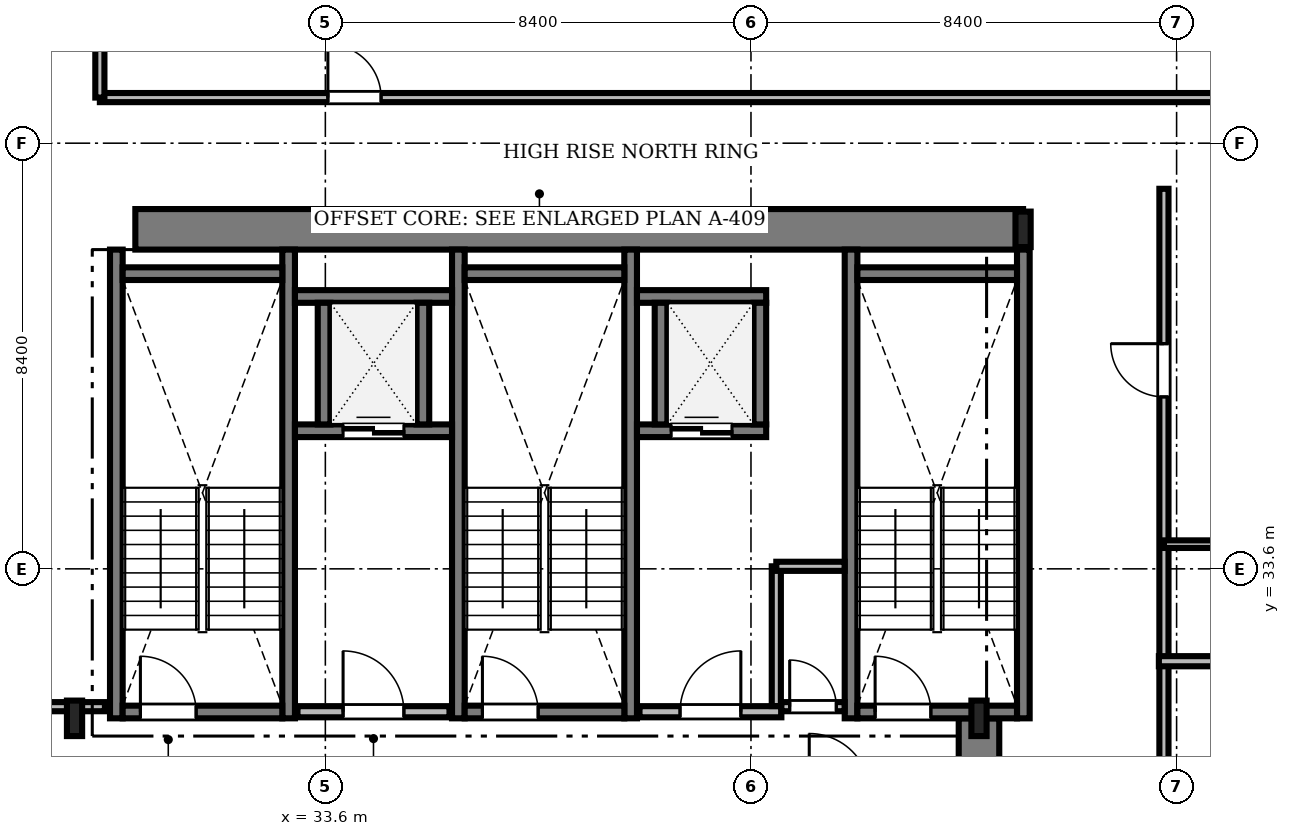
"""IFC4 building model, lengths in metres.
Left out: names, types, materials, properties, quantities, classifications, styles, units other than length and angle.
Written with IfcOpenShell. Run it as: python <this file> out.ifc"""

import sys

from ifc_helpers import new_model, si_unit, direction, frame, frame_2d, origin, origin_2d, place, context, subcontext, project, spatial, rectangle, i_section, extrude, source, transform, mapped, element, fill, save


model = new_model("IFC4")
c1 = context("Model", 3, precision=1e-05, world=origin(), true_north=direction((0.0, 1.0)))
c2 = subcontext(c1, "Body", "Model", "MODEL_VIEW")
j1 = project(units=[si_unit("LENGTHUNIT", "METRE"), si_unit("PLANEANGLEUNIT", "RADIAN")], contexts=[c1])
p1 = place(None, origin())
s1 = spatial("IfcSite", under=j1, at=p1, CompositionType="ELEMENT")
p2 = place(p1, origin())
s2 = spatial("IfcBuilding", under=s1, at=p2, CompositionType="ELEMENT")
p3 = place(p2, frame((0.0, 0.0, 188.55)))
s3 = spatial("IfcBuildingStorey", under=s2, at=p3, CompositionType="ELEMENT", Elevation=188.55)
m1 = source(origin(), c2, "Body", "SweptSolid", [
    extrude(rectangle(XDim=17.52, YDim=0.8, at=frame_2d((8.76, 0.0))), origin(), (0.0, 0.0, 1.0), 3.53),
])
p4 = place(p3, frame((29.85, 40.3, 0.0), z_axis=(0.0, 0.0, 1.0), x_axis=(1.0, 0.0, 0.0)))
e1 = element("IfcWall", 1, at=p4, inside=s3, PredefinedType="SHEAR", context=c2, shape_type="MappedRepresentation", body=[
    mapped(m1, transform((0.0, 0.0, 0.0), scale=1.0)),
])
m2 = source(origin(), c2, "Body", "SweptSolid", [
    extrude(rectangle(XDim=13.15, YDim=0.8, at=frame_2d((6.575, 0.0))), origin(), (0.0, 0.0, 1.0), 3.53),
])
p5 = place(p3, frame((46.5, 17.5, 0.0), z_axis=(0.0, 0.0, 1.0), x_axis=(0.0, 1.0, 0.0)))
e2 = element("IfcWall", 2, at=p5, inside=s3, PredefinedType="SHEAR", context=c2, shape_type="MappedRepresentation", body=[
    mapped(m2, transform((0.0, 0.0, 0.0), scale=1.0)),
])
m3 = source(origin(), c2, "Body", "SweptSolid", [
    extrude(i_section(OverallWidth=0.3, OverallDepth=0.7, WebThickness=0.017, FlangeThickness=0.032, FilletRadius=0.027, at=origin_2d()), origin(), (0.0, 0.0, 1.0), 3.53),
])
for number, where, z_axis, x_axis in (
    (3, (28.65, 30.65, 0.0), (0.0, 0.0, 1.0), (1.0, 0.0, 0.0)),
    (4, (46.5, 30.65, 0.0), (0.0, 0.0, 1.0), (1.0, 0.0, 0.0)),
    (5, (47.37, 40.3, 0.0), (0.0, 0.0, 1.0), (1.0, 0.0, 0.0)),
):
    element("IfcColumn", number, at=place(p3, frame(where, z_axis=z_axis, x_axis=x_axis)), inside=s3, PredefinedType="COLUMN", context=c2, shape_type="MappedRepresentation", body=[
        mapped(m3, transform((0.0, 0.0, 0.0), scale=1.0)),
    ])
m4 = source(origin(), c2, "Body", "SweptSolid", [
    extrude(rectangle(XDim=9.25, YDim=0.25, at=frame_2d((4.625, 0.0))), origin(), (0.0, 0.0, 1.0), 3.55),
])
for number, where, z_axis, x_axis in (
    (6, (29.475, 30.65, 0.0), (0.0, 0.0, 1.0), (0.0, 1.0, 0.0)),
    (7, (32.875, 30.65, 0.0), (0.0, 0.0, 1.0), (0.0, 1.0, 0.0)),
):
    element("IfcWall", number, at=place(p3, frame(where, z_axis=z_axis, x_axis=x_axis)), inside=s3, PredefinedType="SOLIDWALL", context=c2, shape_type="MappedRepresentation", body=[
        mapped(m4, transform((0.0, 0.0, 0.0), scale=1.0)),
    ])
m5 = source(origin(), c2, "Body", "SweptSolid", [
    extrude(rectangle(XDim=3.15, YDim=0.25, at=frame_2d((1.575, 0.0))), origin(), (0.0, 0.0, 1.0), 3.55),
])
p6 = place(p3, frame((29.6, 39.425, 0.0), z_axis=(0.0, 0.0, 1.0), x_axis=(1.0, 0.0, 0.0)))
e8 = element("IfcWall", 8, at=p6, inside=s3, PredefinedType="SOLIDWALL", context=c2, shape_type="MappedRepresentation", body=[
    mapped(m5, transform((0.0, 0.0, 0.0), scale=1.0)),
])
p7 = place(p3, frame((29.6, 30.775, 0.0), z_axis=(0.0, 0.0, 1.0), x_axis=(1.0, 0.0, 0.0)))
e9 = element("IfcWall", 9, at=p7, inside=s3, PredefinedType="SOLIDWALL", context=c2, shape_type="MappedRepresentation", body=[
    mapped(m5, transform((0.0, 0.0, 0.0), scale=1.0)),
])
m6 = source(origin(), c2, "Body", "SweptSolid", [
    extrude(rectangle(XDim=1.1, YDim=2.2, at=frame_2d((0.55, 1.1))), frame((0.0, 0.135, 0.0), z_axis=(0.0, -1.0, 0.0), x_axis=(1.0, 0.0, 0.0)), (0.0, 0.0, 1.0), 0.27),
])
p8 = place(p7, frame((0.35, 0.0, 0.0)))
e10 = element("IfcOpeningElement", 10, at=p8, cuts=e9, PredefinedType="OPENING", context=c2, shape_type="MappedRepresentation", body=[
    mapped(m6, transform((0.0, 0.0, 0.0), scale=1.0)),
])
for number, where, z_axis, x_axis in (
    (11, (36.225, 30.65, 0.0), (0.0, 0.0, 1.0), (0.0, 1.0, 0.0)),
    (12, (39.625, 30.65, 0.0), (0.0, 0.0, 1.0), (0.0, 1.0, 0.0)),
):
    element("IfcWall", number, at=place(p3, frame(where, z_axis=z_axis, x_axis=x_axis)), inside=s3, PredefinedType="SOLIDWALL", context=c2, shape_type="MappedRepresentation", body=[
        mapped(m4, transform((0.0, 0.0, 0.0), scale=1.0)),
    ])
p9 = place(p3, frame((36.35, 39.425, 0.0), z_axis=(0.0, 0.0, 1.0), x_axis=(1.0, 0.0, 0.0)))
e13 = element("IfcWall", 13, at=p9, inside=s3, PredefinedType="SOLIDWALL", context=c2, shape_type="MappedRepresentation", body=[
    mapped(m5, transform((0.0, 0.0, 0.0), scale=1.0)),
])
p10 = place(p3, frame((36.35, 30.775, 0.0), z_axis=(0.0, 0.0, 1.0), x_axis=(1.0, 0.0, 0.0)))
e14 = element("IfcWall", 14, at=p10, inside=s3, PredefinedType="SOLIDWALL", context=c2, shape_type="MappedRepresentation", body=[
    mapped(m5, transform((0.0, 0.0, 0.0), scale=1.0)),
])
p11 = place(p10, frame((0.35, 0.0, 0.0)))
e15 = element("IfcOpeningElement", 15, at=p11, cuts=e14, PredefinedType="OPENING", context=c2, shape_type="MappedRepresentation", body=[
    mapped(m6, transform((0.0, 0.0, 0.0), scale=1.0)),
])
for number, where, z_axis, x_axis in (
    (16, (43.975, 30.65, 0.0), (0.0, 0.0, 1.0), (0.0, 1.0, 0.0)),
    (17, (47.375, 30.65, 0.0), (0.0, 0.0, 1.0), (0.0, 1.0, 0.0)),
):
    element("IfcWall", number, at=place(p3, frame(where, z_axis=z_axis, x_axis=x_axis)), inside=s3, PredefinedType="SOLIDWALL", context=c2, shape_type="MappedRepresentation", body=[
        mapped(m4, transform((0.0, 0.0, 0.0), scale=1.0)),
    ])
p12 = place(p3, frame((44.1, 39.425, 0.0), z_axis=(0.0, 0.0, 1.0), x_axis=(1.0, 0.0, 0.0)))
e18 = element("IfcWall", 18, at=p12, inside=s3, PredefinedType="SOLIDWALL", context=c2, shape_type="MappedRepresentation", body=[
    mapped(m5, transform((0.0, 0.0, 0.0), scale=1.0)),
])
p13 = place(p3, frame((44.1, 30.775, 0.0), z_axis=(0.0, 0.0, 1.0), x_axis=(1.0, 0.0, 0.0)))
e19 = element("IfcWall", 19, at=p13, inside=s3, PredefinedType="SOLIDWALL", context=c2, shape_type="MappedRepresentation", body=[
    mapped(m5, transform((0.0, 0.0, 0.0), scale=1.0)),
])
p14 = place(p13, frame((0.35, 0.0, 0.0)))
e20 = element("IfcOpeningElement", 20, at=p14, cuts=e19, PredefinedType="OPENING", context=c2, shape_type="MappedRepresentation", body=[
    mapped(m6, transform((0.0, 0.0, 0.0), scale=1.0)),
])
m7 = source(origin(), c2, "Body", "SweptSolid", [
    extrude(rectangle(XDim=3.0, YDim=0.22, at=frame_2d((1.5, 0.0))), origin(), (0.0, 0.0, 1.0), 3.53),
])
p15 = place(p3, frame((33.05, 30.78, 0.0), z_axis=(0.0, 0.0, 1.0), x_axis=(1.0, 0.0, 0.0)))
e21 = element("IfcWall", 21, at=p15, inside=s3, PredefinedType="SOLIDWALL", context=c2, shape_type="MappedRepresentation", body=[
    mapped(m7, transform((0.0, 0.0, 0.0), scale=1.0)),
])
m8 = source(origin(), c2, "Body", "SweptSolid", [
    extrude(rectangle(XDim=1.2, YDim=2.2, at=frame_2d((0.6, 1.1))), frame((0.0, 0.12, 0.0), z_axis=(0.0, -1.0, 0.0), x_axis=(1.0, 0.0, 0.0)), (0.0, 0.0, 1.0), 0.24),
])
p16 = place(p15, frame((0.9, 0.0, 0.0)))
e22 = element("IfcOpeningElement", 22, at=p16, cuts=e21, PredefinedType="OPENING", context=c2, shape_type="MappedRepresentation", body=[
    mapped(m8, transform((0.0, 0.0, 0.0), scale=1.0)),
])
m9 = source(origin(), c2, "Body", "SweptSolid", [
    extrude(rectangle(XDim=2.8, YDim=0.22, at=frame_2d((1.4, 0.0))), origin(), (0.0, 0.0, 1.0), 3.53),
])
p17 = place(p3, frame((39.8, 30.78, 0.0), z_axis=(0.0, 0.0, 1.0), x_axis=(1.0, 0.0, 0.0)))
e23 = element("IfcWall", 23, at=p17, inside=s3, PredefinedType="SOLIDWALL", context=c2, shape_type="MappedRepresentation", body=[
    mapped(m9, transform((0.0, 0.0, 0.0), scale=1.0)),
])
p18 = place(p17, frame((0.8, 0.0, 0.0)))
e24 = element("IfcOpeningElement", 24, at=p18, cuts=e23, PredefinedType="OPENING", context=c2, shape_type="MappedRepresentation", body=[
    mapped(m8, transform((0.0, 0.0, 0.0), scale=1.0)),
])
m10 = source(origin(), c2, "Body", "SweptSolid", [
    extrude(rectangle(XDim=3.1, YDim=0.25, at=frame_2d((1.55, 0.0))), origin(), (0.0, 0.0, 1.0), 3.53),
])
p19 = place(p3, frame((33.0, 36.325, 0.0), z_axis=(0.0, 0.0, 1.0), x_axis=(1.0, 0.0, 0.0)))
e25 = element("IfcWall", 25, at=p19, inside=s3, PredefinedType="SOLIDWALL", context=c2, shape_type="MappedRepresentation", body=[
    mapped(m10, transform((0.0, 0.0, 0.0), scale=1.0)),
])
m11 = source(origin(), c2, "Body", "SweptSolid", [
    extrude(rectangle(XDim=1.2, YDim=2.25, at=frame_2d((0.6, 1.125))), frame((0.0, 0.135, 0.0), z_axis=(0.0, -1.0, 0.0), x_axis=(1.0, 0.0, 0.0)), (0.0, 0.0, 1.0), 0.27),
])
p20 = place(p19, frame((0.95, 0.0, 0.0)))
e26 = element("IfcOpeningElement", 26, at=p20, cuts=e25, PredefinedType="OPENING", context=c2, shape_type="MappedRepresentation", body=[
    mapped(m11, transform((0.0, 0.0, 0.0), scale=1.0)),
])
p21 = place(p3, frame((33.0, 38.975, 0.0), z_axis=(0.0, 0.0, 1.0), x_axis=(1.0, 0.0, 0.0)))
e27 = element("IfcWall", 27, at=p21, inside=s3, PredefinedType="SOLIDWALL", context=c2, shape_type="MappedRepresentation", body=[
    mapped(m10, transform((0.0, 0.0, 0.0), scale=1.0)),
])
m12 = source(origin(), c2, "Body", "SweptSolid", [
    extrude(rectangle(XDim=2.4, YDim=0.25, at=frame_2d((1.2, 0.0))), origin(), (0.0, 0.0, 1.0), 3.53),
])
for number, where, z_axis, x_axis in (
    (28, (33.575, 36.45, 0.0), (0.0, 0.0, 1.0), (0.0, 1.0, 0.0)),
    (29, (35.525, 36.45, 0.0), (0.0, 0.0, 1.0), (0.0, 1.0, 0.0)),
):
    element("IfcWall", number, at=place(p3, frame(where, z_axis=z_axis, x_axis=x_axis)), inside=s3, PredefinedType="SOLIDWALL", context=c2, shape_type="MappedRepresentation", body=[
        mapped(m12, transform((0.0, 0.0, 0.0), scale=1.0)),
    ])
m13 = source(origin(), c2, "Body", "SweptSolid", [
    extrude(rectangle(XDim=2.55, YDim=0.25, at=frame_2d((1.275, 0.0))), origin(), (0.0, 0.0, 1.0), 3.53),
])
p22 = place(p3, frame((39.75, 36.325, 0.0), z_axis=(0.0, 0.0, 1.0), x_axis=(1.0, 0.0, 0.0)))
e30 = element("IfcWall", 30, at=p22, inside=s3, PredefinedType="SOLIDWALL", context=c2, shape_type="MappedRepresentation", body=[
    mapped(m13, transform((0.0, 0.0, 0.0), scale=1.0)),
])
p23 = place(p22, frame((0.675, 0.0, 0.0)))
e31 = element("IfcOpeningElement", 31, at=p23, cuts=e30, PredefinedType="OPENING", context=c2, shape_type="MappedRepresentation", body=[
    mapped(m11, transform((0.0, 0.0, 0.0), scale=1.0)),
])
p24 = place(p3, frame((39.75, 38.975, 0.0), z_axis=(0.0, 0.0, 1.0), x_axis=(1.0, 0.0, 0.0)))
e32 = element("IfcWall", 32, at=p24, inside=s3, PredefinedType="SOLIDWALL", context=c2, shape_type="MappedRepresentation", body=[
    mapped(m13, transform((0.0, 0.0, 0.0), scale=1.0)),
])
for number, where, z_axis, x_axis in (
    (33, (40.225, 36.45, 0.0), (0.0, 0.0, 1.0), (0.0, 1.0, 0.0)),
    (34, (42.175, 36.45, 0.0), (0.0, 0.0, 1.0), (0.0, 1.0, 0.0)),
):
    element("IfcWall", number, at=place(p3, frame(where, z_axis=z_axis, x_axis=x_axis)), inside=s3, PredefinedType="SOLIDWALL", context=c2, shape_type="MappedRepresentation", body=[
        mapped(m12, transform((0.0, 0.0, 0.0), scale=1.0)),
    ])
m14 = source(origin(), c2, "Body", "SweptSolid", [
    extrude(rectangle(XDim=28.428, YDim=0.18, at=frame_2d((14.214, 0.0))), origin(), (0.0, 0.0, 1.0), 2.772),
])
p25 = place(p3, frame((29.15, 42.9, 0.0), z_axis=(0.0, 0.0, 1.0), x_axis=(1.0, 0.0, 0.0)))
e35 = element("IfcWall", 35, at=p25, inside=s3, PredefinedType="PARTITIONING", context=c2, shape_type="MappedRepresentation", body=[
    mapped(m14, transform((0.0, 0.0, 0.0), scale=1.0)),
])
m15 = source(origin(), c2, "Body", "SweptSolid", [
    extrude(rectangle(XDim=1.05, YDim=2.2, at=frame_2d((0.525, 1.1))), frame((0.0, 0.1, 0.0), z_axis=(0.0, -1.0, 0.0), x_axis=(1.0, 0.0, 0.0)), (0.0, 0.0, 1.0), 0.2),
])
p26 = place(p25, frame((4.5, 0.0, 0.0)))
e36 = element("IfcOpeningElement", 36, at=p26, cuts=e35, PredefinedType="OPENING", context=c2, shape_type="MappedRepresentation", body=[
    mapped(m15, transform((0.0, 0.0, 0.0), scale=1.0)),
])
m16 = source(origin(), c2, "Body", "SweptSolid", [
    extrude(rectangle(XDim=27.53, YDim=0.18, at=frame_2d((13.765, 0.0))), origin(), (0.0, 0.0, 1.0), 2.972),
])
p27 = place(p3, frame((50.15, 13.57, 0.0), z_axis=(0.0, 0.0, 1.0), x_axis=(0.0, 1.0, 0.0)))
e37 = element("IfcWall", 37, at=p27, inside=s3, PredefinedType="PARTITIONING", context=c2, shape_type="MappedRepresentation", body=[
    mapped(m16, transform((0.0, 0.0, 0.0), scale=1.0)),
])
p28 = place(p27, frame((5.217, 0.0, 0.0)))
e38 = element("IfcOpeningElement", 38, at=p28, cuts=e37, PredefinedType="OPENING", context=c2, shape_type="MappedRepresentation", body=[
    mapped(m15, transform((0.0, 0.0, 0.0), scale=1.0)),
])
p29 = place(p27, frame((14.32, 0.0, 0.0)))
e39 = element("IfcOpeningElement", 39, at=p29, cuts=e37, PredefinedType="OPENING", context=c2, shape_type="MappedRepresentation", body=[
    mapped(m15, transform((0.0, 0.0, 0.0), scale=1.0)),
])
p30 = place(p27, frame((23.423, 0.0, 0.0)))
e40 = element("IfcOpeningElement", 40, at=p30, cuts=e37, PredefinedType="OPENING", context=c2, shape_type="MappedRepresentation", body=[
    mapped(m15, transform((0.0, 0.0, 0.0), scale=1.0)),
])
m17 = source(origin(), c2, "Body", "SweptSolid", [
    extrude(rectangle(XDim=17.828, YDim=0.18, at=frame_2d((8.914, 0.0))), origin(), (0.0, 0.0, 1.0), 2.772),
])
p31 = place(p3, frame((11.422, 30.88, 0.0), z_axis=(0.0, 0.0, 1.0), x_axis=(1.0, 0.0, 0.0)))
e41 = element("IfcWall", 41, at=p31, inside=s3, PredefinedType="PARTITIONING", context=c2, shape_type="MappedRepresentation", body=[
    mapped(m17, transform((0.0, 0.0, 0.0), scale=1.0)),
])
p32 = place(p31, frame((10.778, 0.0, 0.0)))
e42 = element("IfcOpeningElement", 42, at=p32, cuts=e41, PredefinedType="OPENING", context=c2, shape_type="MappedRepresentation", body=[
    mapped(m15, transform((0.0, 0.0, 0.0), scale=1.0)),
])
m18 = source(origin(), c2, "Body", "SweptSolid", [
    extrude(rectangle(XDim=1.248, YDim=0.18, at=frame_2d((0.624, 0.0))), origin(), (0.0, 0.0, 1.0), 3.53),
])
p33 = place(p3, frame((42.6, 30.88, 0.0), z_axis=(0.0, 0.0, 1.0), x_axis=(1.0, 0.0, 0.0)))
e43 = element("IfcWall", 43, at=p33, inside=s3, PredefinedType="PARTITIONING", context=c2, shape_type="MappedRepresentation", body=[
    mapped(m18, transform((0.0, 0.0, 0.0), scale=1.0)),
])
m19 = source(origin(), c2, "Body", "SweptSolid", [
    extrude(rectangle(XDim=0.92, YDim=2.1, at=frame_2d((0.46, 1.05))), frame((0.0, 0.1, 0.0), z_axis=(0.0, -1.0, 0.0), x_axis=(1.0, 0.0, 0.0)), (0.0, 0.0, 1.0), 0.2),
])
p34 = place(p33, frame((0.164, 0.0, 0.0)))
e44 = element("IfcOpeningElement", 44, at=p34, cuts=e43, PredefinedType="OPENING", context=c2, shape_type="MappedRepresentation", body=[
    mapped(m19, transform((0.0, 0.0, 0.0), scale=1.0)),
])
m20 = source(origin(), c2, "Body", "SweptSolid", [
    extrude(rectangle(XDim=7.528, YDim=0.2, at=frame_2d((3.764, 0.0))), origin(), (0.0, 0.0, 1.0), 2.772),
])
p35 = place(p3, frame((50.05, 31.777, 0.0), z_axis=(0.0, 0.0, 1.0), x_axis=(1.0, 0.0, 0.0)))
e45 = element("IfcWall", 45, at=p35, inside=s3, PredefinedType="PARTITIONING", context=c2, shape_type="MappedRepresentation", body=[
    mapped(m20, transform((0.0, 0.0, 0.0), scale=1.0)),
])
m21 = source(origin(), c2, "Body", "SweptSolid", [
    extrude(rectangle(XDim=5.378, YDim=0.18, at=frame_2d((2.689, 0.0))), origin(), (0.0, 0.0, 1.0), 2.772),
])
p36 = place(p3, frame((29.15, 42.9, 0.0), z_axis=(0.0, 0.0, 1.0), x_axis=(0.0, 1.0, 0.0)))
e46 = element("IfcWall", 46, at=p36, inside=s3, PredefinedType="PARTITIONING", context=c2, shape_type="MappedRepresentation", body=[
    mapped(m21, transform((0.0, 0.0, 0.0), scale=1.0)),
])
m22 = source(origin(), c2, "Body", "SweptSolid", [
    extrude(rectangle(XDim=2.758, YDim=0.18, at=frame_2d((1.379, 0.0))), origin(), (0.0, 0.0, 1.0), 3.53),
])
p37 = place(p3, frame((42.5, 30.892, 0.0), z_axis=(0.0, 0.0, 1.0), x_axis=(0.0, 1.0, 0.0)))
e47 = element("IfcWall", 47, at=p37, inside=s3, PredefinedType="PARTITIONING", context=c2, shape_type="MappedRepresentation", body=[
    mapped(m22, transform((0.0, 0.0, 0.0), scale=1.0)),
])
m23 = source(origin(), c2, "Body", "SweptSolid", [
    extrude(rectangle(XDim=2.36, YDim=0.15, at=frame_2d((1.18, 0.0))), origin(), (0.0, 0.0, 1.0), 3.53),
])
p38 = place(p3, frame((50.15, 34.087, 0.0), z_axis=(0.0, 0.0, 1.0), x_axis=(1.0, 0.0, 0.0)))
e48 = element("IfcWall", 48, at=p38, inside=s3, PredefinedType="PARTITIONING", context=c2, shape_type="MappedRepresentation", body=[
    mapped(m23, transform((0.0, 0.0, 0.0), scale=1.0)),
])
m24 = source(origin(), c2, "Body", "SweptSolid", [
    extrude(rectangle(XDim=1.348, YDim=0.18, at=frame_2d((0.674, 0.0))), origin(), (0.0, 0.0, 1.0), 3.53),
])
p39 = place(p3, frame((42.5, 33.65, 0.0), z_axis=(0.0, 0.0, 1.0), x_axis=(1.0, 0.0, 0.0)))
e49 = element("IfcWall", 49, at=p39, inside=s3, PredefinedType="PARTITIONING", context=c2, shape_type="MappedRepresentation", body=[
    mapped(m24, transform((0.0, 0.0, 0.0), scale=1.0)),
])
m25 = source(origin(), c2, "Body", "SweptSolid", [
    extrude(rectangle(XDim=1.1, YDim=2.2, at=frame_2d((0.55, 1.1))), frame((0.0, 0.025, 0.0), z_axis=(0.0, -1.0, 0.0), x_axis=(1.0, 0.0, 0.0)), (0.0, 0.0, 1.0), 0.05),
])
p40 = place(p8, origin())
e50 = element("IfcDoor", 50, at=p40, inside=s3, OperationType="SINGLE_SWING_LEFT", PredefinedType="DOOR", context=c2, shape_type="MappedRepresentation", body=[
    mapped(m25, transform((0.0, 0.0, 0.0), scale=1.0)),
])
fill(e10, e50)
p41 = place(p11, origin())
e51 = element("IfcDoor", 51, at=p41, inside=s3, OperationType="SINGLE_SWING_LEFT", PredefinedType="DOOR", context=c2, shape_type="MappedRepresentation", body=[
    mapped(m25, transform((0.0, 0.0, 0.0), scale=1.0)),
])
fill(e15, e51)
p42 = place(p14, origin())
e52 = element("IfcDoor", 52, at=p42, inside=s3, OperationType="SINGLE_SWING_LEFT", PredefinedType="DOOR", context=c2, shape_type="MappedRepresentation", body=[
    mapped(m25, transform((0.0, 0.0, 0.0), scale=1.0)),
])
fill(e20, e52)
m26 = source(origin(), c2, "Body", "SweptSolid", [
    extrude(rectangle(XDim=1.2, YDim=2.2, at=frame_2d((0.6, 1.1))), frame((0.0, 0.025, 0.0), z_axis=(0.0, -1.0, 0.0), x_axis=(1.0, 0.0, 0.0)), (0.0, 0.0, 1.0), 0.05),
])
p43 = place(p16, origin())
e53 = element("IfcDoor", 53, at=p43, inside=s3, OperationType="SINGLE_SWING_LEFT", PredefinedType="DOOR", context=c2, shape_type="MappedRepresentation", body=[
    mapped(m26, transform((0.0, 0.0, 0.0), scale=1.0)),
])
fill(e22, e53)
p44 = place(p18, origin())
e54 = element("IfcDoor", 54, at=p44, inside=s3, OperationType="SINGLE_SWING_RIGHT", PredefinedType="DOOR", context=c2, shape_type="MappedRepresentation", body=[
    mapped(m26, transform((0.0, 0.0, 0.0), scale=1.0)),
])
fill(e24, e54)
m27 = source(origin(), c2, "Body", "SweptSolid", [
    extrude(rectangle(XDim=1.2, YDim=2.25, at=frame_2d((0.6, 1.125))), frame((0.0, 0.025, 0.0), z_axis=(0.0, -1.0, 0.0), x_axis=(1.0, 0.0, 0.0)), (0.0, 0.0, 1.0), 0.05),
])
p45 = place(p20, origin())
e55 = element("IfcDoor", 55, at=p45, inside=s3, OperationType="DOUBLE_DOOR_SLIDING", PredefinedType="DOOR", context=c2, shape_type="MappedRepresentation", body=[
    mapped(m27, transform((0.0, 0.0, 0.0), scale=1.0)),
])
fill(e26, e55)
p46 = place(p23, origin())
e56 = element("IfcDoor", 56, at=p46, inside=s3, OperationType="DOUBLE_DOOR_SLIDING", PredefinedType="DOOR", context=c2, shape_type="MappedRepresentation", body=[
    mapped(m27, transform((0.0, 0.0, 0.0), scale=1.0)),
])
fill(e31, e56)
m28 = source(origin(), c2, "Body", "SweptSolid", [
    extrude(rectangle(XDim=1.05, YDim=2.2, at=frame_2d((0.525, 1.1))), frame((0.0, 0.025, 0.0), z_axis=(0.0, -1.0, 0.0), x_axis=(1.0, 0.0, 0.0)), (0.0, 0.0, 1.0), 0.05),
])
p47 = place(p26, origin())
e57 = element("IfcDoor", 57, at=p47, inside=s3, OperationType="SINGLE_SWING_LEFT", PredefinedType="DOOR", context=c2, shape_type="MappedRepresentation", body=[
    mapped(m28, transform((0.0, 0.0, 0.0), scale=1.0)),
])
fill(e36, e57)
p48 = place(p30, origin())
e58 = element("IfcDoor", 58, at=p48, inside=s3, OperationType="SINGLE_SWING_RIGHT", PredefinedType="DOOR", context=c2, shape_type="MappedRepresentation", body=[
    mapped(m28, transform((0.0, 0.0, 0.0), scale=1.0)),
])
fill(e40, e58)
m29 = source(origin(), c2, "Body", "SweptSolid", [
    extrude(rectangle(XDim=0.92, YDim=2.1, at=frame_2d((0.46, 1.05))), frame((0.0, 0.025, 0.0), z_axis=(0.0, -1.0, 0.0), x_axis=(1.0, 0.0, 0.0)), (0.0, 0.0, 1.0), 0.05),
])
p49 = place(p34, origin())
e59 = element("IfcDoor", 59, at=p49, inside=s3, OperationType="SINGLE_SWING_LEFT", PredefinedType="DOOR", context=c2, shape_type="MappedRepresentation", body=[
    mapped(m29, transform((0.0, 0.0, 0.0), scale=1.0)),
])
fill(e44, e59)
save(model, sys.argv[1])
